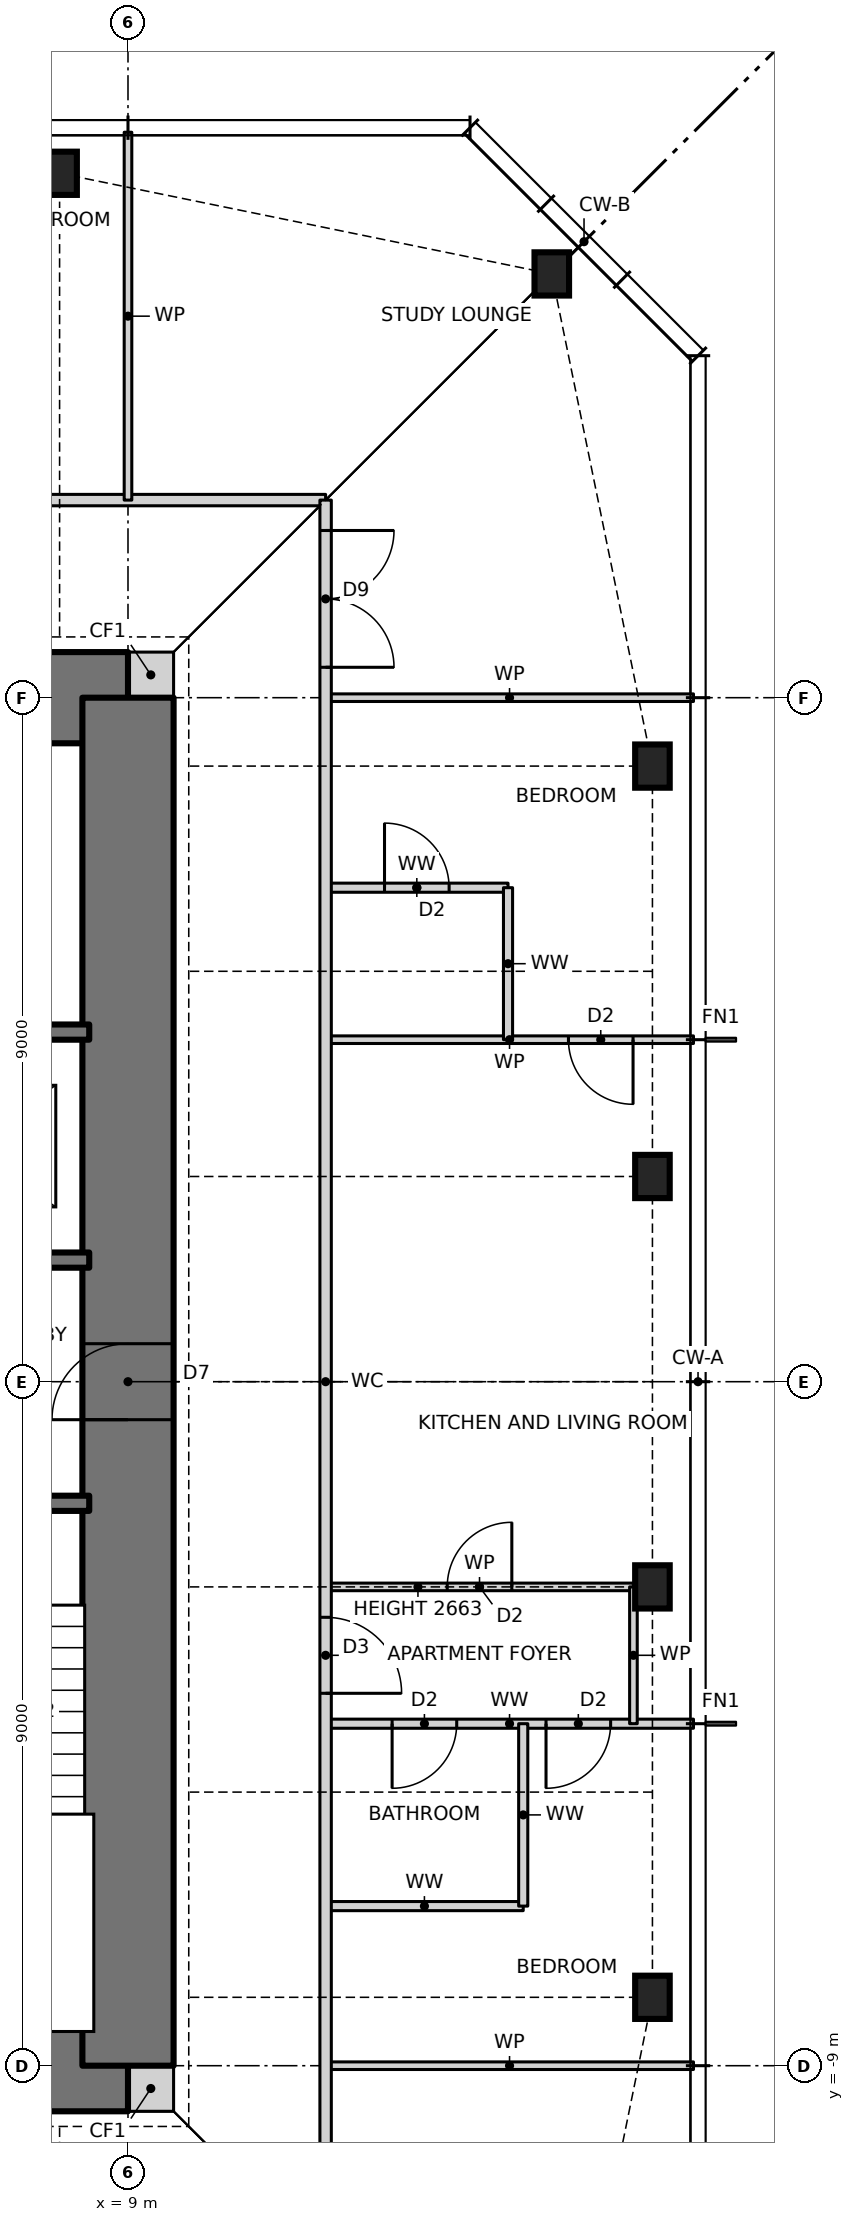
"""IFC4 building model, lengths in metres.
Left out: names, types, materials, properties, quantities, classifications, styles, units other than length and angle.
Written with IfcOpenShell. Run it as: python <this file> out.ifc"""

import sys

from ifc_helpers import new_model, si_unit, direction, frame, frame_2d, origin, origin_2d, place, context, subcontext, project, spatial, rectangle, i_section, extrude, element, fill, save


model = new_model("IFC4")
c1 = context("Model", 3, precision=1e-05, world=origin(), true_north=direction((0.0, 1.0)))
c2 = subcontext(c1, "Body", "Model", "MODEL_VIEW")
j1 = project(units=[si_unit("LENGTHUNIT", "METRE"), si_unit("PLANEANGLEUNIT", "RADIAN")], contexts=[c1])
p1 = place(None, origin())
s1 = spatial("IfcSite", under=j1, at=p1, CompositionType="ELEMENT")
p2 = place(p1, origin())
s2 = spatial("IfcBuilding", under=s1, at=p2, CompositionType="ELEMENT")
p3 = place(p2, frame((0.0, 0.0, 243.0)))
s3 = spatial("IfcBuildingStorey", under=s2, at=p3, CompositionType="ELEMENT", Elevation=243.0)
for number, where, z_axis, x_axis in (
    (1, (15.9, -8.1, 0.0), (0.0, 0.0, 1.0), (1.0, 0.0, 0.0)),
    (2, (15.9, -2.7, 0.0), (0.0, 0.0, 1.0), (1.0, 0.0, 0.0)),
    (3, (15.9, 2.7, 0.0), (0.0, 0.0, 1.0), (1.0, 0.0, 0.0)),
    (4, (15.9, 8.1, 0.0), (0.0, 0.0, 1.0), (1.0, 0.0, 0.0)),
    (5, (14.576, 14.576, 0.0), (0.0, 0.0, 1.0), (1.0, 0.0, 0.0)),
    (6, (8.1, 15.9, 0.0), (0.0, 0.0, 1.0), (1.0, 0.0, 0.0)),
):
    element("IfcColumn", number, at=place(p3, frame(where, z_axis=z_axis, x_axis=x_axis)), inside=s3, PredefinedType="COLUMN", context=c2, shape_type="SweptSolid", body=[
        extrude(i_section(OverallWidth=0.455, OverallDepth=0.569, WebThickness=0.078, FlangeThickness=0.125, at=origin_2d()), origin(), (0.0, 0.0, 1.0), 3.5),
    ])
for number, where, z_axis, x_axis in (
    (7, (9.0, -9.3, 0.0), (0.0, 0.0, 1.0), (1.0, 0.0, 0.0)),
    (8, (9.0, 9.3, 0.0), (0.0, 0.0, 1.0), (1.0, 0.0, 0.0)),
):
    element("IfcWall", number, at=place(p3, frame(where, z_axis=z_axis, x_axis=x_axis)), inside=s3, PredefinedType="SOLIDWALL", context=c2, shape_type="SweptSolid", body=[
        extrude(rectangle(XDim=0.6, YDim=0.6, at=frame_2d((0.3, 0.0))), origin(), (0.0, 0.0, 1.0), 3.5),
    ])
p4 = place(p3, frame((-9.0, -9.0, 0.0), z_axis=(0.0, 0.0, 1.0), x_axis=(1.0, 0.0, 0.0)))
e9 = element("IfcWall", 9, at=p4, inside=s3, PredefinedType="SHEAR", context=c2, shape_type="SweptSolid", body=[
    extrude(rectangle(XDim=18.0, YDim=1.2, at=frame_2d((9.0, 0.0))), origin(), (0.0, 0.0, 1.0), 3.5),
])
p5 = place(p4, frame((3.775, 0.0, 0.0)))
e10 = element("IfcOpeningElement", 10, at=p5, cuts=e9, PredefinedType="OPENING", context=c2, shape_type="SweptSolid", body=[
    extrude(rectangle(XDim=0.9, YDim=2.1, at=frame_2d((0.45, 1.05))), frame((0.0, 0.61, 0.0), z_axis=(0.0, -1.0, 0.0), x_axis=(1.0, 0.0, 0.0)), (0.0, 0.0, 1.0), 1.22),
])
p6 = place(p4, frame((10.625, 0.0, 0.0)))
e11 = element("IfcOpeningElement", 11, at=p6, cuts=e9, PredefinedType="OPENING", context=c2, shape_type="SweptSolid", body=[
    extrude(rectangle(XDim=0.9, YDim=2.1, at=frame_2d((0.45, 1.05))), frame((0.0, 0.61, 0.0), z_axis=(0.0, -1.0, 0.0), x_axis=(1.0, 0.0, 0.0)), (0.0, 0.0, 1.0), 1.22),
])
p7 = place(p3, frame((9.0, 9.0, 0.0), z_axis=(0.0, 0.0, 1.0), x_axis=(-1.0, 0.0, 0.0)))
e12 = element("IfcWall", 12, at=p7, inside=s3, PredefinedType="SHEAR", context=c2, shape_type="SweptSolid", body=[
    extrude(rectangle(XDim=18.0, YDim=1.2, at=frame_2d((9.0, 0.0))), origin(), (0.0, 0.0, 1.0), 3.5),
])
p8 = place(p7, frame((11.125, 0.0, 0.0)))
e13 = element("IfcOpeningElement", 13, at=p8, cuts=e12, PredefinedType="OPENING", context=c2, shape_type="SweptSolid", body=[
    extrude(rectangle(XDim=0.9, YDim=2.1, at=frame_2d((0.45, 1.05))), frame((0.0, 0.61, 0.0), z_axis=(0.0, -1.0, 0.0), x_axis=(1.0, 0.0, 0.0)), (0.0, 0.0, 1.0), 1.22),
])
p9 = place(p7, frame((4.275, 0.0, 0.0)))
e14 = element("IfcOpeningElement", 14, at=p9, cuts=e12, PredefinedType="OPENING", context=c2, shape_type="SweptSolid", body=[
    extrude(rectangle(XDim=0.9, YDim=2.1, at=frame_2d((0.45, 1.05))), frame((0.0, 0.61, 0.0), z_axis=(0.0, -1.0, 0.0), x_axis=(1.0, 0.0, 0.0)), (0.0, 0.0, 1.0), 1.22),
])
p10 = place(p3, frame((9.0, -9.0, 0.0), z_axis=(0.0, 0.0, 1.0), x_axis=(0.0, 1.0, 0.0)))
e15 = element("IfcWall", 15, at=p10, inside=s3, PredefinedType="SHEAR", context=c2, shape_type="SweptSolid", body=[
    extrude(rectangle(XDim=18.0, YDim=1.2, at=frame_2d((9.0, 0.0))), origin(), (0.0, 0.0, 1.0), 3.5),
])
p11 = place(p10, frame((8.5, 0.0, 0.0)))
e16 = element("IfcOpeningElement", 16, at=p11, cuts=e15, PredefinedType="OPENING", context=c2, shape_type="SweptSolid", body=[
    extrude(rectangle(XDim=1.0, YDim=2.1, at=frame_2d((0.5, 1.05))), frame((0.0, 0.61, 0.0), z_axis=(0.0, -1.0, 0.0), x_axis=(1.0, 0.0, 0.0)), (0.0, 0.0, 1.0), 1.22),
])
p12 = place(p3, frame((11.6, -9.0, 0.0), z_axis=(0.0, 0.0, 1.0), x_axis=(1.0, 0.0, 0.0)))
e17 = element("IfcWall", 17, at=p12, inside=s3, PredefinedType="PARTITIONING", context=c2, shape_type="SweptSolid", body=[
    extrude(rectangle(XDim=4.84, YDim=0.1, at=frame_2d((2.42, 0.0))), origin(), (0.0, 0.0, 1.0), 3.27),
])
p13 = place(p3, frame((11.6, -6.9, 0.0), z_axis=(0.0, 0.0, 1.0), x_axis=(1.0, 0.0, 0.0)))
e18 = element("IfcWall", 18, at=p13, inside=s3, PredefinedType="PARTITIONING", context=c2, shape_type="SweptSolid", body=[
    extrude(rectangle(XDim=2.6, YDim=0.12, at=frame_2d((1.3, 0.0))), origin(), (0.0, 0.0, 1.0), 3.27),
])
p14 = place(p3, frame((11.6, -4.5, 0.0), z_axis=(0.0, 0.0, 1.0), x_axis=(1.0, 0.0, 0.0)))
e19 = element("IfcWall", 19, at=p14, inside=s3, PredefinedType="PARTITIONING", context=c2, shape_type="SweptSolid", body=[
    extrude(rectangle(XDim=4.84, YDim=0.12, at=frame_2d((2.42, 0.0))), origin(), (0.0, 0.0, 1.0), 3.27),
])
p15 = place(p14, frame((2.9, 0.0, 0.0)))
e20 = element("IfcOpeningElement", 20, at=p15, cuts=e19, PredefinedType="OPENING", context=c2, shape_type="SweptSolid", body=[
    extrude(rectangle(XDim=0.85, YDim=2.1, at=frame_2d((0.425, 1.05))), frame((0.0, 0.07, 0.0), z_axis=(0.0, -1.0, 0.0), x_axis=(1.0, 0.0, 0.0)), (0.0, 0.0, 1.0), 0.14),
])
p16 = place(p14, frame((0.875, 0.0, 0.0)))
e21 = element("IfcOpeningElement", 21, at=p16, cuts=e19, PredefinedType="OPENING", context=c2, shape_type="SweptSolid", body=[
    extrude(rectangle(XDim=0.85, YDim=2.1, at=frame_2d((0.425, 1.05))), frame((0.0, 0.07, 0.0), z_axis=(0.0, -1.0, 0.0), x_axis=(1.0, 0.0, 0.0)), (0.0, 0.0, 1.0), 0.14),
])
p17 = place(p3, frame((11.6, -2.7, 0.0), z_axis=(0.0, 0.0, 1.0), x_axis=(1.0, 0.0, 0.0)))
e22 = element("IfcWall", 22, at=p17, inside=s3, PredefinedType="PARTITIONING", context=c2, shape_type="SweptSolid", body=[
    extrude(rectangle(XDim=4.05, YDim=0.1, at=frame_2d((2.025, 0.0))), origin(), (0.0, 0.0, 1.0), 2.663),
])
p18 = place(p17, frame((1.6, 0.0, 0.0)))
e23 = element("IfcOpeningElement", 23, at=p18, cuts=e22, PredefinedType="OPENING", context=c2, shape_type="SweptSolid", body=[
    extrude(rectangle(XDim=0.85, YDim=2.1, at=frame_2d((0.425, 1.05))), frame((0.0, 0.06, 0.0), z_axis=(0.0, -1.0, 0.0), x_axis=(1.0, 0.0, 0.0)), (0.0, 0.0, 1.0), 0.12),
])
p19 = place(p3, frame((-8.49, -1.6, 0.0), z_axis=(0.0, 0.0, 1.0), x_axis=(1.0, 0.0, 0.0)))
e24 = element("IfcWall", 24, at=p19, inside=s3, PredefinedType="SOLIDWALL", context=c2, shape_type="SweptSolid", body=[
    extrude(rectangle(XDim=16.98, YDim=0.2, at=frame_2d((8.49, 0.0))), origin(), (0.0, 0.0, 1.0), 3.5),
])
p20 = place(p19, frame((14.81, 0.0, 0.0)))
e25 = element("IfcOpeningElement", 25, at=p20, cuts=e24, PredefinedType="OPENING", context=c2, shape_type="SweptSolid", body=[
    extrude(rectangle(XDim=1.0, YDim=2.1, at=frame_2d((0.5, 1.05))), frame((0.0, 0.11, 0.0), z_axis=(0.0, -1.0, 0.0), x_axis=(1.0, 0.0, 0.0)), (0.0, 0.0, 1.0), 0.22),
])
p21 = place(p19, frame((1.232, 0.0, 0.0)))
e26 = element("IfcOpeningElement", 26, at=p21, cuts=e24, PredefinedType="OPENING", context=c2, shape_type="SweptSolid", body=[
    extrude(rectangle(XDim=0.9, YDim=2.1, at=frame_2d((0.45, 1.05))), frame((0.0, 0.11, 0.0), z_axis=(0.0, -1.0, 0.0), x_axis=(1.0, 0.0, 0.0)), (0.0, 0.0, 1.0), 0.22),
])
p22 = place(p19, frame((4.627, 0.0, 0.0)))
e27 = element("IfcOpeningElement", 27, at=p22, cuts=e24, PredefinedType="OPENING", context=c2, shape_type="SweptSolid", body=[
    extrude(rectangle(XDim=0.9, YDim=2.1, at=frame_2d((0.45, 1.05))), frame((0.0, 0.11, 0.0), z_axis=(0.0, -1.0, 0.0), x_axis=(1.0, 0.0, 0.0)), (0.0, 0.0, 1.0), 0.22),
])
p23 = place(p19, frame((8.052, 0.0, 0.0)))
e28 = element("IfcOpeningElement", 28, at=p23, cuts=e24, PredefinedType="OPENING", context=c2, shape_type="SweptSolid", body=[
    extrude(rectangle(XDim=0.9, YDim=2.1, at=frame_2d((0.45, 1.05))), frame((0.0, 0.11, 0.0), z_axis=(0.0, -1.0, 0.0), x_axis=(1.0, 0.0, 0.0)), (0.0, 0.0, 1.0), 0.22),
])
p24 = place(p19, frame((11.478, 0.0, 0.0)))
e29 = element("IfcOpeningElement", 29, at=p24, cuts=e24, PredefinedType="OPENING", context=c2, shape_type="SweptSolid", body=[
    extrude(rectangle(XDim=0.9, YDim=2.1, at=frame_2d((0.45, 1.05))), frame((0.0, 0.11, 0.0), z_axis=(0.0, -1.0, 0.0), x_axis=(1.0, 0.0, 0.0)), (0.0, 0.0, 1.0), 0.22),
])
p25 = place(p3, frame((-8.49, 1.6, 0.0), z_axis=(0.0, 0.0, 1.0), x_axis=(1.0, 0.0, 0.0)))
e30 = element("IfcWall", 30, at=p25, inside=s3, PredefinedType="SOLIDWALL", context=c2, shape_type="SweptSolid", body=[
    extrude(rectangle(XDim=16.98, YDim=0.2, at=frame_2d((8.49, 0.0))), origin(), (0.0, 0.0, 1.0), 3.5),
])
p26 = place(p25, frame((1.17, 0.0, 0.0)))
e31 = element("IfcOpeningElement", 31, at=p26, cuts=e30, PredefinedType="OPENING", context=c2, shape_type="SweptSolid", body=[
    extrude(rectangle(XDim=1.0, YDim=2.1, at=frame_2d((0.5, 1.05))), frame((0.0, 0.11, 0.0), z_axis=(0.0, -1.0, 0.0), x_axis=(1.0, 0.0, 0.0)), (0.0, 0.0, 1.0), 0.22),
])
p27 = place(p25, frame((4.606, 0.0, 0.0)))
e32 = element("IfcOpeningElement", 32, at=p27, cuts=e30, PredefinedType="OPENING", context=c2, shape_type="SweptSolid", body=[
    extrude(rectangle(XDim=0.9, YDim=2.1, at=frame_2d((0.45, 1.05))), frame((0.0, 0.11, 0.0), z_axis=(0.0, -1.0, 0.0), x_axis=(1.0, 0.0, 0.0)), (0.0, 0.0, 1.0), 0.22),
])
p28 = place(p25, frame((8.04, 0.0, 0.0)))
e33 = element("IfcOpeningElement", 33, at=p28, cuts=e30, PredefinedType="OPENING", context=c2, shape_type="SweptSolid", body=[
    extrude(rectangle(XDim=0.9, YDim=2.1, at=frame_2d((0.45, 1.05))), frame((0.0, 0.11, 0.0), z_axis=(0.0, -1.0, 0.0), x_axis=(1.0, 0.0, 0.0)), (0.0, 0.0, 1.0), 0.22),
])
p29 = place(p25, frame((11.374, 0.0, 0.0)))
e34 = element("IfcOpeningElement", 34, at=p29, cuts=e30, PredefinedType="OPENING", context=c2, shape_type="SweptSolid", body=[
    extrude(rectangle(XDim=1.1, YDim=2.1, at=frame_2d((0.55, 1.05))), frame((0.0, 0.11, 0.0), z_axis=(0.0, -1.0, 0.0), x_axis=(1.0, 0.0, 0.0)), (0.0, 0.0, 1.0), 0.22),
])
p30 = place(p25, frame((14.66, 0.0, 0.0)))
e35 = element("IfcOpeningElement", 35, at=p30, cuts=e30, PredefinedType="OPENING", context=c2, shape_type="SweptSolid", body=[
    extrude(rectangle(XDim=1.3, YDim=2.1, at=frame_2d((0.65, 1.05))), frame((0.0, 0.11, 0.0), z_axis=(0.0, -1.0, 0.0), x_axis=(1.0, 0.0, 0.0)), (0.0, 0.0, 1.0), 0.22),
])
p31 = place(p3, frame((11.6, 4.5, 0.0), z_axis=(0.0, 0.0, 1.0), x_axis=(1.0, 0.0, 0.0)))
e36 = element("IfcWall", 36, at=p31, inside=s3, PredefinedType="PARTITIONING", context=c2, shape_type="SweptSolid", body=[
    extrude(rectangle(XDim=4.84, YDim=0.1, at=frame_2d((2.42, 0.0))), origin(), (0.0, 0.0, 1.0), 3.27),
])
p32 = place(p31, frame((3.195, 0.0, 0.0)))
e37 = element("IfcOpeningElement", 37, at=p32, cuts=e36, PredefinedType="OPENING", context=c2, shape_type="SweptSolid", body=[
    extrude(rectangle(XDim=0.85, YDim=2.1, at=frame_2d((0.425, 1.05))), frame((0.0, 0.06, 0.0), z_axis=(0.0, -1.0, 0.0), x_axis=(1.0, 0.0, 0.0)), (0.0, 0.0, 1.0), 0.12),
])
p33 = place(p3, frame((5.15, 4.6, 0.0), z_axis=(0.0, 0.0, 1.0), x_axis=(1.0, 0.0, 0.0)))
e38 = element("IfcWall", 38, at=p33, inside=s3, PredefinedType="SOLIDWALL", context=c2, shape_type="SweptSolid", body=[
    extrude(rectangle(XDim=3.34, YDim=0.2, at=frame_2d((1.67, 0.0))), origin(), (0.0, 0.0, 1.0), 3.5),
])
p34 = place(p3, frame((11.6, 6.5, 0.0), z_axis=(0.0, 0.0, 1.0), x_axis=(1.0, 0.0, 0.0)))
e39 = element("IfcWall", 39, at=p34, inside=s3, PredefinedType="PARTITIONING", context=c2, shape_type="SweptSolid", body=[
    extrude(rectangle(XDim=2.4, YDim=0.12, at=frame_2d((1.2, 0.0))), origin(), (0.0, 0.0, 1.0), 3.27),
])
p35 = place(p34, frame((0.775, 0.0, 0.0)))
e40 = element("IfcOpeningElement", 40, at=p35, cuts=e39, PredefinedType="OPENING", context=c2, shape_type="SweptSolid", body=[
    extrude(rectangle(XDim=0.85, YDim=2.1, at=frame_2d((0.425, 1.05))), frame((0.0, 0.07, 0.0), z_axis=(0.0, -1.0, 0.0), x_axis=(1.0, 0.0, 0.0)), (0.0, 0.0, 1.0), 0.14),
])
p36 = place(p3, frame((11.6, 9.0, 0.0), z_axis=(0.0, 0.0, 1.0), x_axis=(1.0, 0.0, 0.0)))
e41 = element("IfcWall", 41, at=p36, inside=s3, PredefinedType="PARTITIONING", context=c2, shape_type="SweptSolid", body=[
    extrude(rectangle(XDim=4.84, YDim=0.1, at=frame_2d((2.42, 0.0))), origin(), (0.0, 0.0, 1.0), 3.27),
])
p37 = place(p3, frame((-11.6, 11.6, 0.0), z_axis=(0.0, 0.0, 1.0), x_axis=(1.0, 0.0, 0.0)))
e42 = element("IfcWall", 42, at=p37, inside=s3, PredefinedType="PARTITIONING", context=c2, shape_type="SweptSolid", body=[
    extrude(rectangle(XDim=23.2, YDim=0.15, at=frame_2d((11.6, 0.0))), origin(), (0.0, 0.0, 1.0), 3.27),
])
p38 = place(p37, frame((14.7, 0.0, 0.0)))
e43 = element("IfcOpeningElement", 43, at=p38, cuts=e42, PredefinedType="OPENING", context=c2, shape_type="SweptSolid", body=[
    extrude(rectangle(XDim=1.0, YDim=2.1, at=frame_2d((0.5, 1.05))), frame((0.0, 0.085, 0.0), z_axis=(0.0, -1.0, 0.0), x_axis=(1.0, 0.0, 0.0)), (0.0, 0.0, 1.0), 0.17),
])
p39 = place(p37, frame((0.4, 0.0, 0.0)))
e44 = element("IfcOpeningElement", 44, at=p39, cuts=e42, PredefinedType="OPENING", context=c2, shape_type="SweptSolid", body=[
    extrude(rectangle(XDim=1.8, YDim=2.1, at=frame_2d((0.9, 1.05))), frame((0.0, 0.085, 0.0), z_axis=(0.0, -1.0, 0.0), x_axis=(1.0, 0.0, 0.0)), (0.0, 0.0, 1.0), 0.17),
])
p40 = place(p3, frame((15.65, -4.5, 0.0), z_axis=(0.0, 0.0, 1.0), x_axis=(0.0, 1.0, 0.0)))
e45 = element("IfcWall", 45, at=p40, inside=s3, PredefinedType="PARTITIONING", context=c2, shape_type="SweptSolid", body=[
    extrude(rectangle(XDim=1.8, YDim=0.1, at=frame_2d((0.9, 0.0))), origin(), (0.0, 0.0, 1.0), 3.27),
])
p41 = place(p3, frame((14.2, -6.9, 0.0), z_axis=(0.0, 0.0, 1.0), x_axis=(0.0, 1.0, 0.0)))
e46 = element("IfcWall", 46, at=p41, inside=s3, PredefinedType="PARTITIONING", context=c2, shape_type="SweptSolid", body=[
    extrude(rectangle(XDim=2.4, YDim=0.12, at=frame_2d((1.2, 0.0))), origin(), (0.0, 0.0, 1.0), 3.27),
])
p42 = place(p3, frame((14.0, 4.5, 0.0), z_axis=(0.0, 0.0, 1.0), x_axis=(0.0, 1.0, 0.0)))
e47 = element("IfcWall", 47, at=p42, inside=s3, PredefinedType="PARTITIONING", context=c2, shape_type="SweptSolid", body=[
    extrude(rectangle(XDim=2.0, YDim=0.12, at=frame_2d((1.0, 0.0))), origin(), (0.0, 0.0, 1.0), 3.27),
])
p43 = place(p3, frame((11.6, -11.6, 0.0), z_axis=(0.0, 0.0, 1.0), x_axis=(0.0, 1.0, 0.0)))
e48 = element("IfcWall", 48, at=p43, inside=s3, PredefinedType="PARTITIONING", context=c2, shape_type="SweptSolid", body=[
    extrude(rectangle(XDim=23.2, YDim=0.15, at=frame_2d((11.6, 0.0))), origin(), (0.0, 0.0, 1.0), 3.27),
])
p44 = place(p43, frame((7.5, 0.0, 0.0)))
e49 = element("IfcOpeningElement", 49, at=p44, cuts=e48, PredefinedType="OPENING", context=c2, shape_type="SweptSolid", body=[
    extrude(rectangle(XDim=1.0, YDim=2.1, at=frame_2d((0.5, 1.05))), frame((0.0, 0.085, 0.0), z_axis=(0.0, -1.0, 0.0), x_axis=(1.0, 0.0, 0.0)), (0.0, 0.0, 1.0), 0.17),
])
p45 = place(p43, frame((21.0, 0.0, 0.0)))
e50 = element("IfcOpeningElement", 50, at=p45, cuts=e48, PredefinedType="OPENING", context=c2, shape_type="SweptSolid", body=[
    extrude(rectangle(XDim=1.8, YDim=2.1, at=frame_2d((0.9, 1.05))), frame((0.0, 0.085, 0.0), z_axis=(0.0, -1.0, 0.0), x_axis=(1.0, 0.0, 0.0)), (0.0, 0.0, 1.0), 0.17),
])
p46 = place(p3, frame((9.0, 11.6, 0.0), z_axis=(0.0, 0.0, 1.0), x_axis=(0.0, 1.0, 0.0)))
e51 = element("IfcWall", 51, at=p46, inside=s3, PredefinedType="PARTITIONING", context=c2, shape_type="SweptSolid", body=[
    extrude(rectangle(XDim=4.84, YDim=0.1, at=frame_2d((2.42, 0.0))), origin(), (0.0, 0.0, 1.0), 3.27),
])
p47 = place(p44, frame((1.0, 0.0, 0.0), z_axis=(0.0, 0.0, 1.0), x_axis=(-1.0, 0.0, 0.0)))
e52 = element("IfcDoor", 52, at=p47, inside=s3, OperationType="SINGLE_SWING_RIGHT", PredefinedType="DOOR", context=c2, shape_type="SweptSolid", body=[
    extrude(rectangle(XDim=1.0, YDim=2.1, at=frame_2d((0.5, 1.05))), frame((0.0, 0.025, 0.0), z_axis=(0.0, -1.0, 0.0), x_axis=(1.0, 0.0, 0.0)), (0.0, 0.0, 1.0), 0.05),
])
fill(e49, e52)
p48 = place(p18, origin())
e53 = element("IfcDoor", 53, at=p48, inside=s3, OperationType="SINGLE_SWING_RIGHT", PredefinedType="DOOR", context=c2, shape_type="SweptSolid", body=[
    extrude(rectangle(XDim=0.85, YDim=2.1, at=frame_2d((0.425, 1.05))), frame((0.0, 0.025, 0.0), z_axis=(0.0, -1.0, 0.0), x_axis=(1.0, 0.0, 0.0)), (0.0, 0.0, 1.0), 0.05),
])
fill(e23, e53)
p49 = place(p15, frame((0.85, 0.0, 0.0), z_axis=(0.0, 0.0, 1.0), x_axis=(-1.0, 0.0, 0.0)))
e54 = element("IfcDoor", 54, at=p49, inside=s3, OperationType="SINGLE_SWING_RIGHT", PredefinedType="DOOR", context=c2, shape_type="SweptSolid", body=[
    extrude(rectangle(XDim=0.85, YDim=2.1, at=frame_2d((0.425, 1.05))), frame((0.0, 0.025, 0.0), z_axis=(0.0, -1.0, 0.0), x_axis=(1.0, 0.0, 0.0)), (0.0, 0.0, 1.0), 0.05),
])
fill(e20, e54)
p50 = place(p16, frame((0.85, 0.0, 0.0), z_axis=(0.0, 0.0, 1.0), x_axis=(-1.0, 0.0, 0.0)))
e55 = element("IfcDoor", 55, at=p50, inside=s3, OperationType="SINGLE_SWING_RIGHT", PredefinedType="DOOR", context=c2, shape_type="SweptSolid", body=[
    extrude(rectangle(XDim=0.85, YDim=2.1, at=frame_2d((0.425, 1.05))), frame((0.0, 0.025, 0.0), z_axis=(0.0, -1.0, 0.0), x_axis=(1.0, 0.0, 0.0)), (0.0, 0.0, 1.0), 0.05),
])
fill(e21, e55)
p51 = place(p32, frame((0.85, 0.0, 0.0), z_axis=(0.0, 0.0, 1.0), x_axis=(-1.0, 0.0, 0.0)))
e56 = element("IfcDoor", 56, at=p51, inside=s3, OperationType="SINGLE_SWING_LEFT", PredefinedType="DOOR", context=c2, shape_type="SweptSolid", body=[
    extrude(rectangle(XDim=0.85, YDim=2.1, at=frame_2d((0.425, 1.05))), frame((0.0, 0.025, 0.0), z_axis=(0.0, -1.0, 0.0), x_axis=(1.0, 0.0, 0.0)), (0.0, 0.0, 1.0), 0.05),
])
fill(e37, e56)
p52 = place(p35, origin())
e57 = element("IfcDoor", 57, at=p52, inside=s3, OperationType="SINGLE_SWING_LEFT", PredefinedType="DOOR", context=c2, shape_type="SweptSolid", body=[
    extrude(rectangle(XDim=0.85, YDim=2.1, at=frame_2d((0.425, 1.05))), frame((0.0, 0.025, 0.0), z_axis=(0.0, -1.0, 0.0), x_axis=(1.0, 0.0, 0.0)), (0.0, 0.0, 1.0), 0.05),
])
fill(e40, e57)
p53 = place(p45, frame((1.8, 0.0, 0.0), z_axis=(0.0, 0.0, 1.0), x_axis=(-1.0, 0.0, 0.0)))
e58 = element("IfcDoor", 58, at=p53, inside=s3, OperationType="DOUBLE_DOOR_SINGLE_SWING", PredefinedType="DOOR", context=c2, shape_type="SweptSolid", body=[
    extrude(rectangle(XDim=1.8, YDim=2.1, at=frame_2d((0.9, 1.05))), frame((0.0, 0.025, 0.0), z_axis=(0.0, -1.0, 0.0), x_axis=(1.0, 0.0, 0.0)), (0.0, 0.0, 1.0), 0.05),
])
fill(e50, e58)
p54 = place(p11, origin())
e59 = element("IfcDoor", 59, at=p54, inside=s3, OperationType="SINGLE_SWING_LEFT", PredefinedType="DOOR", context=c2, shape_type="SweptSolid", body=[
    extrude(rectangle(XDim=1.0, YDim=2.1, at=frame_2d((0.5, 1.05))), frame((0.0, 0.025, 0.0), z_axis=(0.0, -1.0, 0.0), x_axis=(1.0, 0.0, 0.0)), (0.0, 0.0, 1.0), 0.05),
])
fill(e16, e59)
save(model, sys.argv[1])
